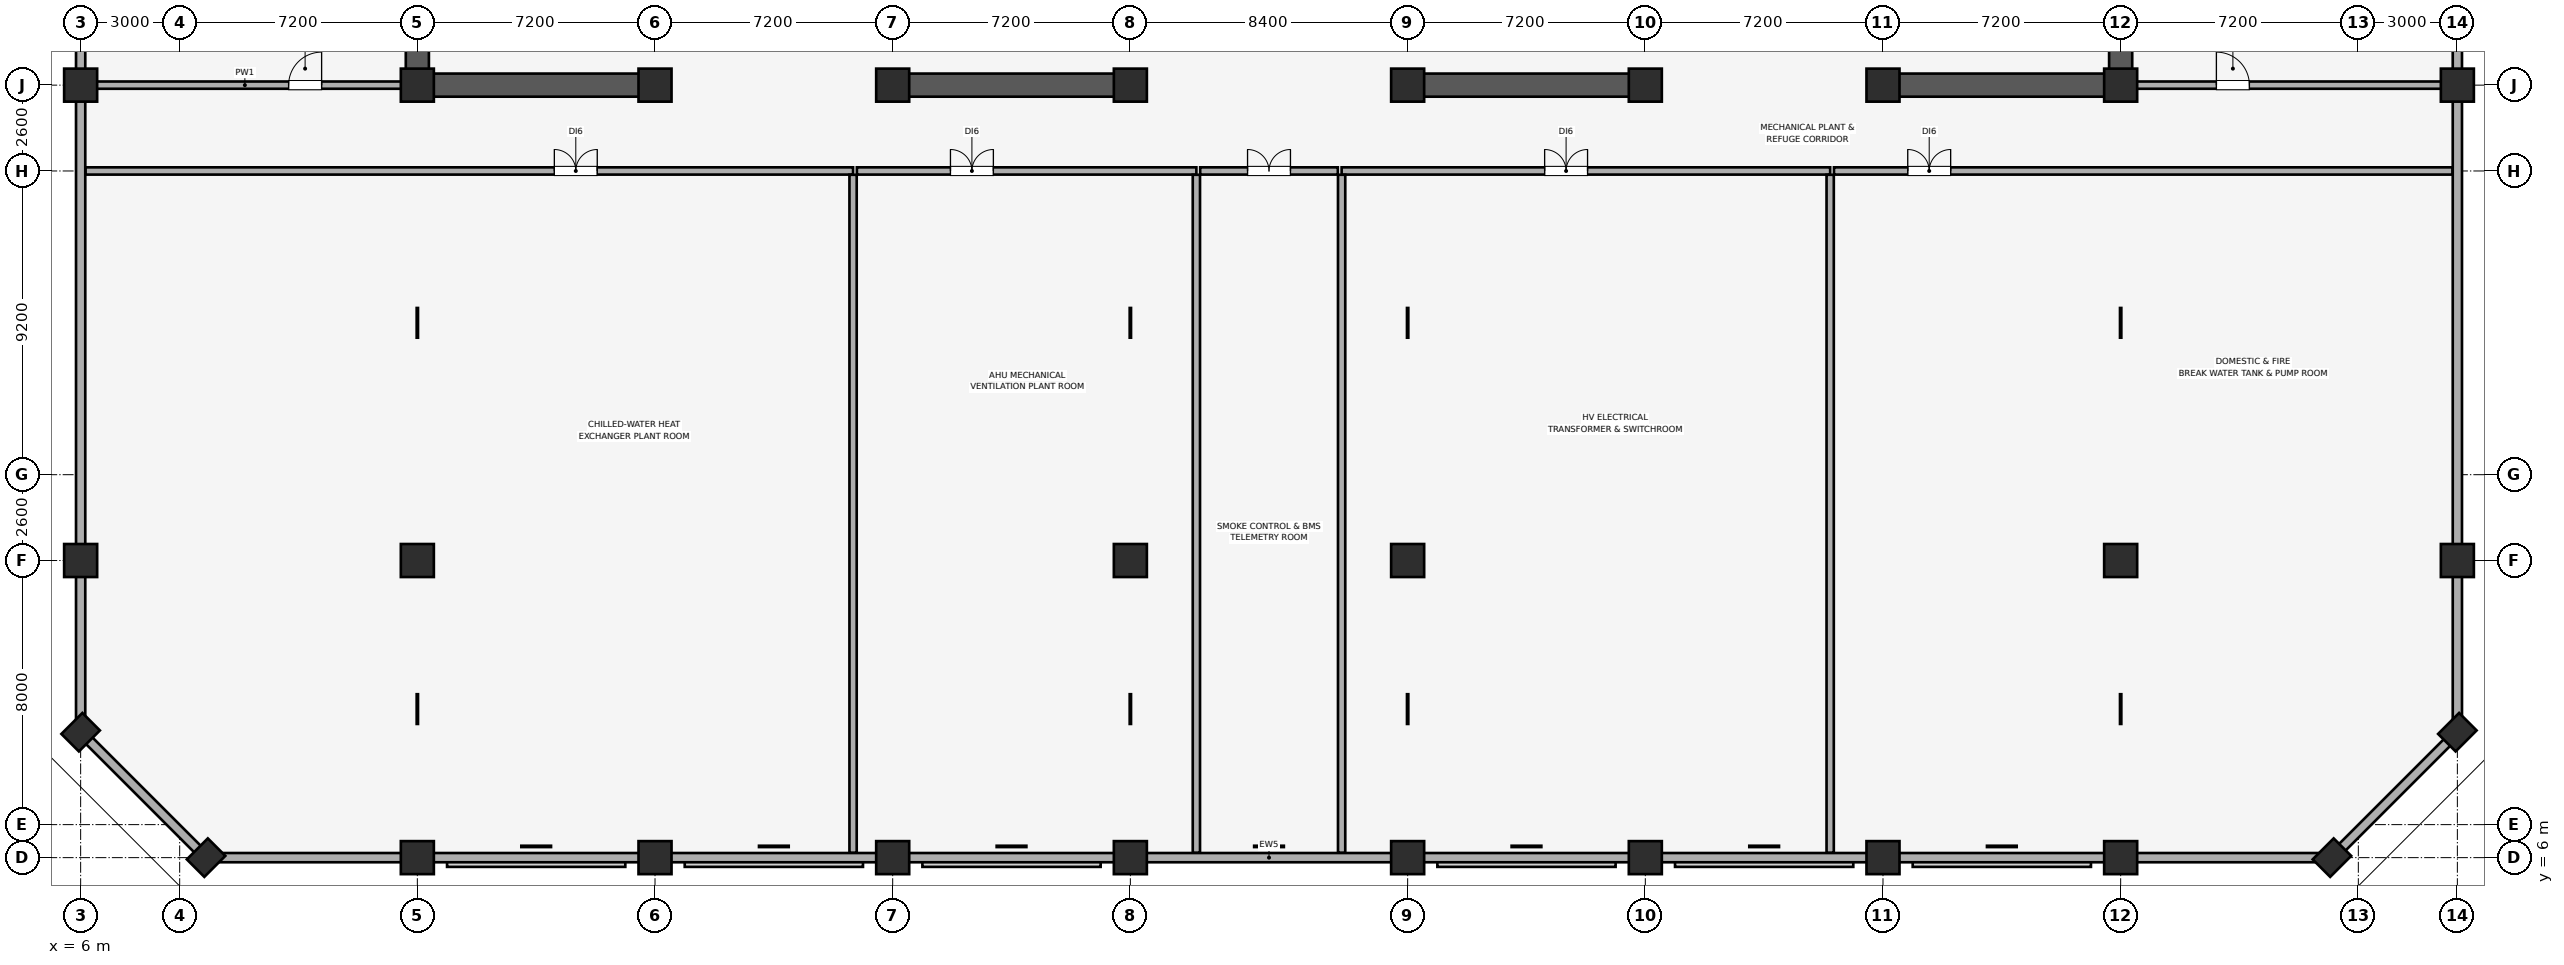
"""IFC4 building model, lengths in metres.
Left out: names, types, materials, properties, quantities, classifications, styles, units other than length and angle.
Written with IfcOpenShell. Run it as: python <this file> out.ifc"""

import sys

from ifc_helpers import new_model, si_unit, direction, frame, frame_2d, origin, origin_2d, place, context, subcontext, project, spatial, rectangle, extrude, element, fill, save


model = new_model("IFC4")
c1 = context("Model", 3, precision=1e-05, world=origin(), true_north=direction((0.0, 1.0)))
c2 = subcontext(c1, "Body", "Model", "MODEL_VIEW")
j1 = project(units=[si_unit("LENGTHUNIT", "METRE"), si_unit("PLANEANGLEUNIT", "RADIAN")], contexts=[c1])
p1 = place(None, origin())
s1 = spatial("IfcSite", under=j1, at=p1, CompositionType="ELEMENT")
p2 = place(p1, origin())
s2 = spatial("IfcBuilding", under=s1, at=p2, CompositionType="ELEMENT")
p3 = place(p2, frame((0.0, 0.0, 280.5)))
s3 = spatial("IfcBuildingStorey", under=s2, at=p3, CompositionType="ELEMENT", Elevation=280.5)
for number, where, z_axis, x_axis in (
    (1, (16.2, 6.0, 0.0), (0.0, 0.0, 1.0), (1.0, 0.0, 0.0)),
    (2, (23.4, 6.0, 0.0), (0.0, 0.0, 1.0), (1.0, 0.0, 0.0)),
    (3, (30.6, 6.0, 0.0), (0.0, 0.0, 1.0), (1.0, 0.0, 0.0)),
    (4, (37.8, 6.0, 0.0), (0.0, 0.0, 1.0), (1.0, 0.0, 0.0)),
    (5, (46.2, 6.0, 0.0), (0.0, 0.0, 1.0), (1.0, 0.0, 0.0)),
    (6, (53.4, 6.0, 0.0), (0.0, 0.0, 1.0), (1.0, 0.0, 0.0)),
    (7, (60.6, 6.0, 0.0), (0.0, 0.0, 1.0), (1.0, 0.0, 0.0)),
    (8, (67.8, 6.0, 0.0), (0.0, 0.0, 1.0), (1.0, 0.0, 0.0)),
    (9, (6.0, 15.0, 0.0), (0.0, 0.0, 1.0), (1.0, 0.0, 0.0)),
    (10, (78.0, 15.0, 0.0), (0.0, 0.0, 1.0), (1.0, 0.0, 0.0)),
    (11, (6.0, 29.4, 0.0), (0.0, 0.0, 1.0), (1.0, 0.0, 0.0)),
    (12, (78.0, 29.4, 0.0), (0.0, 0.0, 1.0), (1.0, 0.0, 0.0)),
):
    element("IfcColumn", number, at=place(p3, frame(where, z_axis=z_axis, x_axis=x_axis)), inside=s3, PredefinedType="COLUMN", context=c2, shape_type="SweptSolid", body=[
        extrude(rectangle(XDim=1.0, YDim=1.0, at=origin_2d()), origin(), (0.0, 0.0, 1.0), 5.1),
    ])
for number, where, z_axis, x_axis in (
    (13, (9.8, 6.0, 0.0), (0.0, 0.0, 1.0), (0.707, 0.707, 0.0)),
    (14, (74.2, 6.0, 0.0), (0.0, 0.0, 1.0), (0.707, 0.707, 0.0)),
    (15, (78.0, 9.8, 0.0), (0.0, 0.0, 1.0), (0.707, 0.707, 0.0)),
    (16, (6.0, 9.8, 0.0), (0.0, 0.0, 1.0), (0.707, 0.707, 0.0)),
):
    element("IfcColumn", number, at=place(p3, frame(where, z_axis=z_axis, x_axis=x_axis)), inside=s3, PredefinedType="PILASTER", context=c2, shape_type="SweptSolid", body=[
        extrude(rectangle(XDim=0.9, YDim=0.75, at=origin_2d()), origin(), (0.0, 0.0, 1.0), 5.1),
    ])
for number, where, z_axis, x_axis in (
    (17, (16.2, 15.0, 0.0), (0.0, 0.0, 1.0), (1.0, 0.0, 0.0)),
    (18, (37.8, 15.0, 0.0), (0.0, 0.0, 1.0), (1.0, 0.0, 0.0)),
    (19, (46.2, 15.0, 0.0), (0.0, 0.0, 1.0), (1.0, 0.0, 0.0)),
    (20, (67.8, 15.0, 0.0), (0.0, 0.0, 1.0), (1.0, 0.0, 0.0)),
    (21, (16.2, 29.4, 0.0), (0.0, 0.0, 1.0), (1.0, 0.0, 0.0)),
    (22, (23.4, 29.4, 0.0), (0.0, 0.0, 1.0), (1.0, 0.0, 0.0)),
    (23, (30.6, 29.4, 0.0), (0.0, 0.0, 1.0), (1.0, 0.0, 0.0)),
    (24, (37.8, 29.4, 0.0), (0.0, 0.0, 1.0), (1.0, 0.0, 0.0)),
    (25, (46.2, 29.4, 0.0), (0.0, 0.0, 1.0), (1.0, 0.0, 0.0)),
    (26, (53.4, 29.4, 0.0), (0.0, 0.0, 1.0), (1.0, 0.0, 0.0)),
    (27, (60.6, 29.4, 0.0), (0.0, 0.0, 1.0), (1.0, 0.0, 0.0)),
    (28, (67.8, 29.4, 0.0), (0.0, 0.0, 1.0), (1.0, 0.0, 0.0)),
):
    element("IfcColumn", number, at=place(p3, frame(where, z_axis=z_axis, x_axis=x_axis)), inside=s3, PredefinedType="COLUMN", context=c2, shape_type="SweptSolid", body=[
        extrude(rectangle(XDim=1.0, YDim=1.0, at=origin_2d()), origin(), (0.0, 0.0, 1.0), 5.1),
    ])
p4 = place(p3, frame((9.8, 6.0, 0.0), z_axis=(0.0, 0.0, 1.0), x_axis=(1.0, 0.0, 0.0)))
e29 = element("IfcWall", 29, at=p4, inside=s3, PredefinedType="SOLIDWALL", context=c2, shape_type="SweptSolid", body=[
    extrude(rectangle(XDim=64.4, YDim=0.28, at=frame_2d((32.2, 0.0))), origin(), (0.0, 0.0, 1.0), 4.0),
])
p5 = place(p3, frame((74.2, 6.0, 0.0), z_axis=(0.0, 0.0, 1.0), x_axis=(0.707106781187, 0.707106781187, 0.0)))
e30 = element("IfcWall", 30, at=p5, inside=s3, PredefinedType="SOLIDWALL", context=c2, shape_type="SweptSolid", body=[
    extrude(rectangle(XDim=5.374, YDim=0.28, at=frame_2d((2.687, 0.0))), origin(), (0.0, 0.0, 1.0), 5.1),
])
for number, where, z_axis, x_axis in (
    (31, (78.0, 9.8, 0.0), (0.0, 0.0, 1.0), (0.0, 1.0, 0.0)),
    (32, (6.0, 45.2, 0.0), (0.0, 0.0, 1.0), (0.0, -1.0, 0.0)),
):
    element("IfcWall", number, at=place(p3, frame(where, z_axis=z_axis, x_axis=x_axis)), inside=s3, PredefinedType="SOLIDWALL", context=c2, shape_type="SweptSolid", body=[
        extrude(rectangle(XDim=35.4, YDim=0.28, at=frame_2d((17.7, 0.0))), origin(), (0.0, 0.0, 1.0), 5.1),
    ])
p6 = place(p3, frame((6.0, 9.8, 0.0), z_axis=(0.0, 0.0, 1.0), x_axis=(0.707106781187, -0.707106781187, 0.0)))
e33 = element("IfcWall", 33, at=p6, inside=s3, PredefinedType="SOLIDWALL", context=c2, shape_type="SweptSolid", body=[
    extrude(rectangle(XDim=5.374, YDim=0.28, at=frame_2d((2.687, 0.0))), origin(), (0.0, 0.0, 1.0), 5.1),
])
for number, where, z_axis, x_axis in (
    (34, (16.2, 29.4, 0.0), (0.0, 0.0, 1.0), (0.0, 1.0, 0.0)),
    (35, (67.8, 29.4, 0.0), (0.0, 0.0, 1.0), (0.0, 1.0, 0.0)),
):
    element("IfcWall", number, at=place(p3, frame(where, z_axis=z_axis, x_axis=x_axis)), inside=s3, PredefinedType="SHEAR", context=c2, shape_type="SweptSolid", body=[
        extrude(rectangle(XDim=19.2, YDim=0.7, at=frame_2d((9.6, 0.0))), origin(), (0.0, 0.0, 1.0), 5.1),
    ])
p7 = place(p3, frame((16.555, 29.4, 0.0), z_axis=(0.0, 0.0, 1.0), x_axis=(1.0, 0.0, 0.0)))
e36 = element("IfcWall", 36, at=p7, inside=s3, PredefinedType="SHEAR", context=c2, shape_type="SweptSolid", body=[
    extrude(rectangle(XDim=7.045, YDim=0.7, at=frame_2d((3.522, 0.0))), origin(), (0.0, 0.0, 1.0), 5.1),
])
for number, where, z_axis, x_axis in (
    (37, (30.4, 29.4, 0.0), (0.0, 0.0, 1.0), (1.0, 0.0, 0.0)),
    (38, (46.0, 29.4, 0.0), (0.0, 0.0, 1.0), (1.0, 0.0, 0.0)),
):
    element("IfcWall", number, at=place(p3, frame(where, z_axis=z_axis, x_axis=x_axis)), inside=s3, PredefinedType="SHEAR", context=c2, shape_type="SweptSolid", body=[
        extrude(rectangle(XDim=7.6, YDim=0.7, at=frame_2d((3.8, 0.0))), origin(), (0.0, 0.0, 1.0), 5.1),
    ])
p8 = place(p3, frame((60.4, 29.4, 0.0), z_axis=(0.0, 0.0, 1.0), x_axis=(1.0, 0.0, 0.0)))
e39 = element("IfcWall", 39, at=p8, inside=s3, PredefinedType="SHEAR", context=c2, shape_type="SweptSolid", body=[
    extrude(rectangle(XDim=7.045, YDim=0.7, at=frame_2d((3.522, 0.0))), origin(), (0.0, 0.0, 1.0), 5.1),
])
p9 = place(p3, frame((6.15, 29.4, 0.0), z_axis=(0.0, 0.0, 1.0), x_axis=(1.0, 0.0, 0.0)))
e40 = element("IfcWall", 40, at=p9, inside=s3, PredefinedType="PARTITIONING", context=c2, shape_type="SweptSolid", body=[
    extrude(rectangle(XDim=9.65, YDim=0.22, at=frame_2d((4.825, 0.0))), origin(), (0.0, 0.0, 1.0), 4.0),
])
p10 = place(p9, frame((6.15, 0.0, 0.0)))
e41 = element("IfcOpeningElement", 41, at=p10, cuts=e40, PredefinedType="OPENING", context=c2, shape_type="SweptSolid", body=[
    extrude(rectangle(XDim=1.0, YDim=2.15, at=frame_2d((0.5, 1.075))), frame((0.0, 0.12, 0.0), z_axis=(0.0, -1.0, 0.0), x_axis=(1.0, 0.0, 0.0)), (0.0, 0.0, 1.0), 0.24),
])
p11 = place(p3, frame((68.2, 29.4, 0.0), z_axis=(0.0, 0.0, 1.0), x_axis=(1.0, 0.0, 0.0)))
e42 = element("IfcWall", 42, at=p11, inside=s3, PredefinedType="PARTITIONING", context=c2, shape_type="SweptSolid", body=[
    extrude(rectangle(XDim=9.65, YDim=0.22, at=frame_2d((4.825, 0.0))), origin(), (0.0, 0.0, 1.0), 4.0),
])
p12 = place(p11, frame((2.5, 0.0, 0.0)))
e43 = element("IfcOpeningElement", 43, at=p12, cuts=e42, PredefinedType="OPENING", context=c2, shape_type="SweptSolid", body=[
    extrude(rectangle(XDim=1.0, YDim=2.15, at=frame_2d((0.5, 1.075))), frame((0.0, 0.12, 0.0), z_axis=(0.0, -1.0, 0.0), x_axis=(1.0, 0.0, 0.0)), (0.0, 0.0, 1.0), 0.24),
])
p13 = place(p3, frame((6.15, 26.8, 0.0), z_axis=(0.0, 0.0, 1.0), x_axis=(1.0, 0.0, 0.0)))
e44 = element("IfcWall", 44, at=p13, inside=s3, PredefinedType="PARTITIONING", context=c2, shape_type="SweptSolid", body=[
    extrude(rectangle(XDim=23.25, YDim=0.22, at=frame_2d((11.625, 0.0))), origin(), (0.0, 0.0, 1.0), 5.1),
])
p14 = place(p13, frame((14.2, 0.0, 0.0)))
e45 = element("IfcOpeningElement", 45, at=p14, cuts=e44, PredefinedType="OPENING", context=c2, shape_type="SweptSolid", body=[
    extrude(rectangle(XDim=1.3, YDim=2.2, at=frame_2d((0.65, 1.1))), frame((0.0, 0.12, 0.0), z_axis=(0.0, -1.0, 0.0), x_axis=(1.0, 0.0, 0.0)), (0.0, 0.0, 1.0), 0.24),
])
p15 = place(p3, frame((29.4, 6.15, 0.0), z_axis=(0.0, 0.0, 1.0), x_axis=(0.0, 1.0, 0.0)))
e46 = element("IfcWall", 46, at=p15, inside=s3, PredefinedType="PARTITIONING", context=c2, shape_type="SweptSolid", body=[
    extrude(rectangle(XDim=20.535, YDim=0.22, at=frame_2d((10.268, 0.0))), origin(), (0.0, 0.0, 1.0), 4.53),
])
p16 = place(p3, frame((29.515, 26.8, 0.0), z_axis=(0.0, 0.0, 1.0), x_axis=(1.0, 0.0, 0.0)))
e47 = element("IfcWall", 47, at=p16, inside=s3, PredefinedType="PARTITIONING", context=c2, shape_type="SweptSolid", body=[
    extrude(rectangle(XDim=10.285, YDim=0.22, at=frame_2d((5.143, 0.0))), origin(), (0.0, 0.0, 1.0), 5.1),
])
p17 = place(p16, frame((2.835, 0.0, 0.0)))
e48 = element("IfcOpeningElement", 48, at=p17, cuts=e47, PredefinedType="OPENING", context=c2, shape_type="SweptSolid", body=[
    extrude(rectangle(XDim=1.3, YDim=2.2, at=frame_2d((0.65, 1.1))), frame((0.0, 0.12, 0.0), z_axis=(0.0, -1.0, 0.0), x_axis=(1.0, 0.0, 0.0)), (0.0, 0.0, 1.0), 0.24),
])
p18 = place(p3, frame((39.8, 6.15, 0.0), z_axis=(0.0, 0.0, 1.0), x_axis=(0.0, 1.0, 0.0)))
e49 = element("IfcWall", 49, at=p18, inside=s3, PredefinedType="PARTITIONING", context=c2, shape_type="SweptSolid", body=[
    extrude(rectangle(XDim=20.535, YDim=0.22, at=frame_2d((10.268, 0.0))), origin(), (0.0, 0.0, 1.0), 5.1),
])
p19 = place(p3, frame((44.2, 26.8, 0.0), z_axis=(0.0, 0.0, 1.0), x_axis=(1.0, 0.0, 0.0)))
e50 = element("IfcWall", 50, at=p19, inside=s3, PredefinedType="PARTITIONING", context=c2, shape_type="SweptSolid", body=[
    extrude(rectangle(XDim=14.8, YDim=0.22, at=frame_2d((7.4, 0.0))), origin(), (0.0, 0.0, 1.0), 5.1),
])
p20 = place(p19, frame((6.15, 0.0, 0.0)))
e51 = element("IfcOpeningElement", 51, at=p20, cuts=e50, PredefinedType="OPENING", context=c2, shape_type="SweptSolid", body=[
    extrude(rectangle(XDim=1.3, YDim=2.2, at=frame_2d((0.65, 1.1))), frame((0.0, 0.12, 0.0), z_axis=(0.0, -1.0, 0.0), x_axis=(1.0, 0.0, 0.0)), (0.0, 0.0, 1.0), 0.24),
])
for number, where, z_axis, x_axis in (
    (52, (44.2, 6.15, 0.0), (0.0, 0.0, 1.0), (0.0, 1.0, 0.0)),
    (53, (59.0, 6.15, 0.0), (0.0, 0.0, 1.0), (0.0, 1.0, 0.0)),
):
    element("IfcWall", number, at=place(p3, frame(where, z_axis=z_axis, x_axis=x_axis)), inside=s3, PredefinedType="PARTITIONING", context=c2, shape_type="SweptSolid", body=[
        extrude(rectangle(XDim=20.535, YDim=0.22, at=frame_2d((10.268, 0.0))), origin(), (0.0, 0.0, 1.0), 5.1),
    ])
p21 = place(p3, frame((59.115, 26.8, 0.0), z_axis=(0.0, 0.0, 1.0), x_axis=(1.0, 0.0, 0.0)))
e54 = element("IfcWall", 54, at=p21, inside=s3, PredefinedType="PARTITIONING", context=c2, shape_type="SweptSolid", body=[
    extrude(rectangle(XDim=18.735, YDim=0.22, at=frame_2d((9.368, 0.0))), origin(), (0.0, 0.0, 1.0), 5.1),
])
p22 = place(p21, frame((2.235, 0.0, 0.0)))
e55 = element("IfcOpeningElement", 55, at=p22, cuts=e54, PredefinedType="OPENING", context=c2, shape_type="SweptSolid", body=[
    extrude(rectangle(XDim=1.3, YDim=2.2, at=frame_2d((0.65, 1.1))), frame((0.0, 0.12, 0.0), z_axis=(0.0, -1.0, 0.0), x_axis=(1.0, 0.0, 0.0)), (0.0, 0.0, 1.0), 0.24),
])
p23 = place(p3, frame((39.915, 26.8, 0.0), z_axis=(0.0, 0.0, 1.0), x_axis=(1.0, 0.0, 0.0)))
e56 = element("IfcWall", 56, at=p23, inside=s3, PredefinedType="PARTITIONING", context=c2, shape_type="SweptSolid", body=[
    extrude(rectangle(XDim=4.17, YDim=0.22, at=frame_2d((2.085, 0.0))), origin(), (0.0, 0.0, 1.0), 5.1),
])
p24 = place(p23, frame((1.435, 0.0, 0.0)))
e57 = element("IfcOpeningElement", 57, at=p24, cuts=e56, PredefinedType="OPENING", context=c2, shape_type="SweptSolid", body=[
    extrude(rectangle(XDim=1.3, YDim=2.2, at=frame_2d((0.65, 1.1))), frame((0.0, 0.12, 0.0), z_axis=(0.0, -1.0, 0.0), x_axis=(1.0, 0.0, 0.0)), (0.0, 0.0, 1.0), 0.24),
])
p25 = place(p10, origin())
e58 = element("IfcDoor", 58, at=p25, inside=s3, OperationType="SINGLE_SWING_RIGHT", PredefinedType="DOOR", context=c2, shape_type="SweptSolid", body=[
    extrude(rectangle(XDim=1.0, YDim=2.15, at=frame_2d((0.5, 1.075))), frame((0.0, 0.025, 0.0), z_axis=(0.0, -1.0, 0.0), x_axis=(1.0, 0.0, 0.0)), (0.0, 0.0, 1.0), 0.05),
])
fill(e41, e58)
p26 = place(p12, origin())
e59 = element("IfcDoor", 59, at=p26, inside=s3, OperationType="SINGLE_SWING_LEFT", PredefinedType="DOOR", context=c2, shape_type="SweptSolid", body=[
    extrude(rectangle(XDim=1.0, YDim=2.15, at=frame_2d((0.5, 1.075))), frame((0.0, 0.025, 0.0), z_axis=(0.0, -1.0, 0.0), x_axis=(1.0, 0.0, 0.0)), (0.0, 0.0, 1.0), 0.05),
])
fill(e43, e59)
p27 = place(p14, origin())
e60 = element("IfcDoor", 60, at=p27, inside=s3, OperationType="DOUBLE_DOOR_SINGLE_SWING", PredefinedType="DOOR", context=c2, shape_type="SweptSolid", body=[
    extrude(rectangle(XDim=1.3, YDim=2.2, at=frame_2d((0.65, 1.1))), frame((0.0, 0.025, 0.0), z_axis=(0.0, -1.0, 0.0), x_axis=(1.0, 0.0, 0.0)), (0.0, 0.0, 1.0), 0.05),
])
fill(e45, e60)
p28 = place(p17, origin())
e61 = element("IfcDoor", 61, at=p28, inside=s3, OperationType="DOUBLE_DOOR_SINGLE_SWING", PredefinedType="DOOR", context=c2, shape_type="SweptSolid", body=[
    extrude(rectangle(XDim=1.3, YDim=2.2, at=frame_2d((0.65, 1.1))), frame((0.0, 0.025, 0.0), z_axis=(0.0, -1.0, 0.0), x_axis=(1.0, 0.0, 0.0)), (0.0, 0.0, 1.0), 0.05),
])
fill(e48, e61)
p29 = place(p20, origin())
e62 = element("IfcDoor", 62, at=p29, inside=s3, OperationType="DOUBLE_DOOR_SINGLE_SWING", PredefinedType="DOOR", context=c2, shape_type="SweptSolid", body=[
    extrude(rectangle(XDim=1.3, YDim=2.2, at=frame_2d((0.65, 1.1))), frame((0.0, 0.025, 0.0), z_axis=(0.0, -1.0, 0.0), x_axis=(1.0, 0.0, 0.0)), (0.0, 0.0, 1.0), 0.05),
])
fill(e51, e62)
p30 = place(p22, origin())
e63 = element("IfcDoor", 63, at=p30, inside=s3, OperationType="DOUBLE_DOOR_SINGLE_SWING", PredefinedType="DOOR", context=c2, shape_type="SweptSolid", body=[
    extrude(rectangle(XDim=1.3, YDim=2.2, at=frame_2d((0.65, 1.1))), frame((0.0, 0.025, 0.0), z_axis=(0.0, -1.0, 0.0), x_axis=(1.0, 0.0, 0.0)), (0.0, 0.0, 1.0), 0.05),
])
fill(e55, e63)
p31 = place(p24, origin())
e64 = element("IfcDoor", 64, at=p31, inside=s3, OperationType="DOUBLE_DOOR_SINGLE_SWING", PredefinedType="DOOR", context=c2, shape_type="SweptSolid", body=[
    extrude(rectangle(XDim=1.3, YDim=2.2, at=frame_2d((0.65, 1.1))), frame((0.0, 0.025, 0.0), z_axis=(0.0, -1.0, 0.0), x_axis=(1.0, 0.0, 0.0)), (0.0, 0.0, 1.0), 0.05),
])
fill(e57, e64)
save(model, sys.argv[1])
